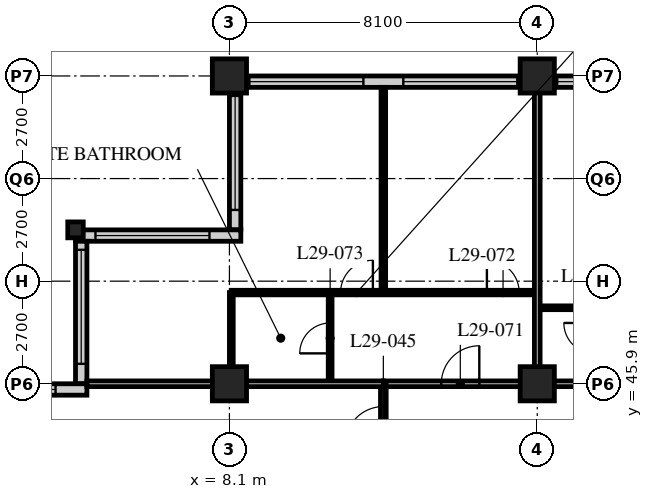
"""IFC4 building model, lengths in metres.
Left out: names, types, materials, properties, quantities, classifications, styles, units other than length and angle.
Written with IfcOpenShell. Run it as: python <this file> out.ifc"""

import sys

from ifc_helpers import new_model, si_unit, direction, frame, frame_2d, origin, origin_2d, place, context, subcontext, project, spatial, rectangle, hollow_rectangle, i_section, extrude, element, fill, save


model = new_model("IFC4")
c1 = context("Model", 3, precision=1e-05, world=origin(), true_north=direction((0.0, 1.0)))
c2 = subcontext(c1, "Body", "Model", "MODEL_VIEW")
j1 = project(units=[si_unit("LENGTHUNIT", "METRE"), si_unit("PLANEANGLEUNIT", "RADIAN")], contexts=[c1])
p1 = place(None, origin())
s1 = spatial("IfcSite", under=j1, at=p1, CompositionType="ELEMENT")
p2 = place(p1, origin())
s2 = spatial("IfcBuilding", under=s1, at=p2, CompositionType="ELEMENT")
p3 = place(p2, frame((0.0, 0.0, 117.0)))
s3 = spatial("IfcBuildingStorey", under=s2, at=p3, CompositionType="ELEMENT", Elevation=117.0)
p4 = place(p3, frame((4.05, 49.95, 0.0), z_axis=(0.0, 0.0, 1.0), x_axis=(1.0, 0.0, 0.0)))
e1 = element("IfcColumn", 1, at=p4, inside=s3, PredefinedType="COLUMN", context=c2, shape_type="SweptSolid", body=[
    extrude(i_section(OverallWidth=0.407, OverallDepth=0.419, WebThickness=0.031, FlangeThickness=0.049, FilletRadius=0.015, at=origin_2d()), origin(), (0.0, 0.0, 1.0), 3.4),
])
for number, where, z_axis, x_axis in (
    (2, (8.1, 45.9, 0.0), (0.0, 0.0, 1.0), (1.0, 0.0, 0.0)),
    (3, (8.1, 54.0, 0.0), (0.0, 0.0, 1.0), (1.0, 0.0, 0.0)),
    (4, (16.2, 45.9, 0.0), (0.0, 0.0, 1.0), (1.0, 0.0, 0.0)),
    (5, (16.2, 54.0, 0.0), (0.0, 0.0, 1.0), (1.0, 0.0, 0.0)),
):
    element("IfcColumn", number, at=place(p3, frame(where, z_axis=z_axis, x_axis=x_axis)), inside=s3, PredefinedType="COLUMN", context=c2, shape_type="SweptSolid", body=[
        extrude(hollow_rectangle(XDim=0.9, YDim=0.9, WallThickness=0.09, at=origin_2d()), origin(), (0.0, 0.0, 1.0), 3.4),
    ])
p5 = place(p3, frame((48.3, 53.85, 0.0), z_axis=(0.0, 0.0, 1.0), x_axis=(-1.0, 0.0, 0.0)))
e6 = element("IfcWall", 6, at=p5, inside=s3, PredefinedType="SOLIDWALL", context=c2, shape_type="SweptSolid", body=[
    extrude(rectangle(XDim=40.2, YDim=0.3, at=frame_2d((20.1, 0.0))), origin(), (0.0, 0.0, 1.0), 3.19),
])
p6 = place(p5, frame((0.225, 0.0, 0.9)))
e7 = element("IfcOpeningElement", 7, at=p6, cuts=e6, PredefinedType="OPENING", context=c2, shape_type="SweptSolid", body=[
    extrude(rectangle(XDim=3.0, YDim=2.0, at=frame_2d((1.5, 1.0))), frame((0.0, 0.16, 0.0), z_axis=(0.0, -1.0, 0.0), x_axis=(1.0, 0.0, 0.0)), (0.0, 0.0, 1.0), 0.32),
])
p7 = place(p5, frame((4.275, 0.0, 0.9)))
e8 = element("IfcOpeningElement", 8, at=p7, cuts=e6, PredefinedType="OPENING", context=c2, shape_type="SweptSolid", body=[
    extrude(rectangle(XDim=3.0, YDim=2.0, at=frame_2d((1.5, 1.0))), frame((0.0, 0.16, 0.0), z_axis=(0.0, -1.0, 0.0), x_axis=(1.0, 0.0, 0.0)), (0.0, 0.0, 1.0), 0.32),
])
p8 = place(p5, frame((8.325, 0.0, 0.9)))
e9 = element("IfcOpeningElement", 9, at=p8, cuts=e6, PredefinedType="OPENING", context=c2, shape_type="SweptSolid", body=[
    extrude(rectangle(XDim=3.0, YDim=2.0, at=frame_2d((1.5, 1.0))), frame((0.0, 0.16, 0.0), z_axis=(0.0, -1.0, 0.0), x_axis=(1.0, 0.0, 0.0)), (0.0, 0.0, 1.0), 0.32),
])
p9 = place(p5, frame((12.375, 0.0, 0.9)))
e10 = element("IfcOpeningElement", 10, at=p9, cuts=e6, PredefinedType="OPENING", context=c2, shape_type="SweptSolid", body=[
    extrude(rectangle(XDim=3.0, YDim=2.0, at=frame_2d((1.5, 1.0))), frame((0.0, 0.16, 0.0), z_axis=(0.0, -1.0, 0.0), x_axis=(1.0, 0.0, 0.0)), (0.0, 0.0, 1.0), 0.32),
])
p10 = place(p5, frame((16.425, 0.0, 0.9)))
e11 = element("IfcOpeningElement", 11, at=p10, cuts=e6, PredefinedType="OPENING", context=c2, shape_type="SweptSolid", body=[
    extrude(rectangle(XDim=3.0, YDim=2.0, at=frame_2d((1.5, 1.0))), frame((0.0, 0.16, 0.0), z_axis=(0.0, -1.0, 0.0), x_axis=(1.0, 0.0, 0.0)), (0.0, 0.0, 1.0), 0.32),
])
p11 = place(p5, frame((20.475, 0.0, 0.9)))
e12 = element("IfcOpeningElement", 12, at=p11, cuts=e6, PredefinedType="OPENING", context=c2, shape_type="SweptSolid", body=[
    extrude(rectangle(XDim=3.0, YDim=2.0, at=frame_2d((1.5, 1.0))), frame((0.0, 0.16, 0.0), z_axis=(0.0, -1.0, 0.0), x_axis=(1.0, 0.0, 0.0)), (0.0, 0.0, 1.0), 0.32),
])
p12 = place(p5, frame((24.525, 0.0, 0.9)))
e13 = element("IfcOpeningElement", 13, at=p12, cuts=e6, PredefinedType="OPENING", context=c2, shape_type="SweptSolid", body=[
    extrude(rectangle(XDim=3.0, YDim=2.0, at=frame_2d((1.5, 1.0))), frame((0.0, 0.16, 0.0), z_axis=(0.0, -1.0, 0.0), x_axis=(1.0, 0.0, 0.0)), (0.0, 0.0, 1.0), 0.32),
])
p13 = place(p5, frame((28.575, 0.0, 0.9)))
e14 = element("IfcOpeningElement", 14, at=p13, cuts=e6, PredefinedType="OPENING", context=c2, shape_type="SweptSolid", body=[
    extrude(rectangle(XDim=3.0, YDim=2.0, at=frame_2d((1.5, 1.0))), frame((0.0, 0.16, 0.0), z_axis=(0.0, -1.0, 0.0), x_axis=(1.0, 0.0, 0.0)), (0.0, 0.0, 1.0), 0.32),
])
p14 = place(p5, frame((32.625, 0.0, 0.9)))
e15 = element("IfcOpeningElement", 15, at=p14, cuts=e6, PredefinedType="OPENING", context=c2, shape_type="SweptSolid", body=[
    extrude(rectangle(XDim=3.0, YDim=2.0, at=frame_2d((1.5, 1.0))), frame((0.0, 0.16, 0.0), z_axis=(0.0, -1.0, 0.0), x_axis=(1.0, 0.0, 0.0)), (0.0, 0.0, 1.0), 0.32),
])
p15 = place(p5, frame((36.675, 0.0, 0.9)))
e16 = element("IfcOpeningElement", 16, at=p15, cuts=e6, PredefinedType="OPENING", context=c2, shape_type="SweptSolid", body=[
    extrude(rectangle(XDim=3.0, YDim=2.0, at=frame_2d((1.5, 1.0))), frame((0.0, 0.16, 0.0), z_axis=(0.0, -1.0, 0.0), x_axis=(1.0, 0.0, 0.0)), (0.0, 0.0, 1.0), 0.32),
])
p16 = place(p3, frame((8.25, 53.7, 0.0), z_axis=(0.0, 0.0, 1.0), x_axis=(0.0, -1.0, 0.0)))
e17 = element("IfcWall", 17, at=p16, inside=s3, PredefinedType="SOLIDWALL", context=c2, shape_type="SweptSolid", body=[
    extrude(rectangle(XDim=3.75, YDim=0.3, at=frame_2d((1.875, 0.0))), origin(), (0.0, 0.0, 1.0), 3.19),
])
p17 = place(p16, frame((0.225, 0.0, 0.9)))
e18 = element("IfcOpeningElement", 18, at=p17, cuts=e17, PredefinedType="OPENING", context=c2, shape_type="SweptSolid", body=[
    extrude(rectangle(XDim=3.0, YDim=1.5, at=frame_2d((1.5, 0.75))), frame((0.0, 0.16, 0.0), z_axis=(0.0, -1.0, 0.0), x_axis=(1.0, 0.0, 0.0)), (0.0, 0.0, 1.0), 0.32),
])
p18 = place(p3, frame((8.4, 49.8, 0.0), z_axis=(0.0, 0.0, 1.0), x_axis=(-1.0, 0.0, 0.0)))
e19 = element("IfcWall", 19, at=p18, inside=s3, PredefinedType="SOLIDWALL", context=c2, shape_type="SweptSolid", body=[
    extrude(rectangle(XDim=4.35, YDim=0.3, at=frame_2d((2.175, 0.0))), origin(), (0.0, 0.0, 1.0), 3.19),
])
p19 = place(p18, frame((0.825, 0.0, 0.9)))
e20 = element("IfcOpeningElement", 20, at=p19, cuts=e19, PredefinedType="OPENING", context=c2, shape_type="SweptSolid", body=[
    extrude(rectangle(XDim=3.0, YDim=1.5, at=frame_2d((1.5, 0.75))), frame((0.0, 0.16, 0.0), z_axis=(0.0, -1.0, 0.0), x_axis=(1.0, 0.0, 0.0)), (0.0, 0.0, 1.0), 0.32),
])
p20 = place(p3, frame((4.2, 49.65, 0.0), z_axis=(0.0, 0.0, 1.0), x_axis=(0.0, -1.0, 0.0)))
e21 = element("IfcWall", 21, at=p20, inside=s3, PredefinedType="SOLIDWALL", context=c2, shape_type="SweptSolid", body=[
    extrude(rectangle(XDim=3.75, YDim=0.3, at=frame_2d((1.875, 0.0))), origin(), (0.0, 0.0, 1.0), 3.19),
])
p21 = place(p20, frame((0.225, 0.0, 0.9)))
e22 = element("IfcOpeningElement", 22, at=p21, cuts=e21, PredefinedType="OPENING", context=c2, shape_type="SweptSolid", body=[
    extrude(rectangle(XDim=3.0, YDim=1.5, at=frame_2d((1.5, 0.75))), frame((0.0, 0.16, 0.0), z_axis=(0.0, -1.0, 0.0), x_axis=(1.0, 0.0, 0.0)), (0.0, 0.0, 1.0), 0.32),
])
p22 = place(p3, frame((4.35, 45.75, 0.0), z_axis=(0.0, 0.0, 1.0), x_axis=(-1.0, 0.0, 0.0)))
e23 = element("IfcWall", 23, at=p22, inside=s3, PredefinedType="SOLIDWALL", context=c2, shape_type="SweptSolid", body=[
    extrude(rectangle(XDim=4.35, YDim=0.3, at=frame_2d((2.175, 0.0))), origin(), (0.0, 0.0, 1.0), 3.19),
])
p23 = place(p22, frame((0.825, 0.0, 0.9)))
e24 = element("IfcOpeningElement", 24, at=p23, cuts=e23, PredefinedType="OPENING", context=c2, shape_type="SweptSolid", body=[
    extrude(rectangle(XDim=3.0, YDim=1.5, at=frame_2d((1.5, 0.75))), frame((0.0, 0.16, 0.0), z_axis=(0.0, -1.0, 0.0), x_axis=(1.0, 0.0, 0.0)), (0.0, 0.0, 1.0), 0.32),
])
p24 = place(p3, frame((12.15, 45.9, 0.0), z_axis=(0.0, 0.0, 1.0), x_axis=(1.0, 0.0, 0.0)))
e25 = element("IfcWall", 25, at=p24, inside=s3, PredefinedType="PARTITIONING", context=c2, shape_type="SweptSolid", body=[
    extrude(rectangle(XDim=32.4, YDim=0.15, at=frame_2d((16.2, 0.0))), origin(), (0.0, 0.0, 1.0), 2.578),
])
p25 = place(p24, frame((5.95, 0.0, 0.0)))
e26 = element("IfcOpeningElement", 26, at=p25, cuts=e25, PredefinedType="OPENING", context=c2, shape_type="SweptSolid", body=[
    extrude(rectangle(XDim=1.0, YDim=2.1, at=frame_2d((0.5, 1.05))), frame((0.0, 0.085, 0.0), z_axis=(0.0, -1.0, 0.0), x_axis=(1.0, 0.0, 0.0)), (0.0, 0.0, 1.0), 0.17),
])
p26 = place(p24, frame((14.05, 0.0, 0.0)))
e27 = element("IfcOpeningElement", 27, at=p26, cuts=e25, PredefinedType="OPENING", context=c2, shape_type="SweptSolid", body=[
    extrude(rectangle(XDim=1.0, YDim=2.1, at=frame_2d((0.5, 1.05))), frame((0.0, 0.085, 0.0), z_axis=(0.0, -1.0, 0.0), x_axis=(1.0, 0.0, 0.0)), (0.0, 0.0, 1.0), 0.17),
])
p27 = place(p24, frame((25.7, 0.0, 0.0)))
e28 = element("IfcOpeningElement", 28, at=p27, cuts=e25, PredefinedType="OPENING", context=c2, shape_type="SweptSolid", body=[
    extrude(rectangle(XDim=1.0, YDim=2.1, at=frame_2d((0.5, 1.05))), frame((0.0, 0.085, 0.0), z_axis=(0.0, -1.0, 0.0), x_axis=(1.0, 0.0, 0.0)), (0.0, 0.0, 1.0), 0.17),
])
p28 = place(p24, frame((29.875, 0.0, 0.0)))
e29 = element("IfcOpeningElement", 29, at=p28, cuts=e25, PredefinedType="OPENING", context=c2, shape_type="SweptSolid", body=[
    extrude(rectangle(XDim=1.0, YDim=2.1, at=frame_2d((0.5, 1.05))), frame((0.0, 0.085, 0.0), z_axis=(0.0, -1.0, 0.0), x_axis=(1.0, 0.0, 0.0)), (0.0, 0.0, 1.0), 0.17),
])
p29 = place(p24, frame((1.525, 0.0, 0.0)))
e30 = element("IfcOpeningElement", 30, at=p29, cuts=e25, PredefinedType="OPENING", context=c2, shape_type="SweptSolid", body=[
    extrude(rectangle(XDim=1.0, YDim=2.1, at=frame_2d((0.5, 1.05))), frame((0.0, 0.085, 0.0), z_axis=(0.0, -1.0, 0.0), x_axis=(1.0, 0.0, 0.0)), (0.0, 0.0, 1.0), 0.17),
])
p30 = place(p3, frame((12.15, 17.55, 0.0), z_axis=(0.0, 0.0, 1.0), x_axis=(0.0, 1.0, 0.0)))
e31 = element("IfcWall", 31, at=p30, inside=s3, PredefinedType="PARTITIONING", context=c2, shape_type="SweptSolid", body=[
    extrude(rectangle(XDim=28.35, YDim=0.15, at=frame_2d((14.175, 0.0))), origin(), (0.0, 0.0, 1.0), 3.19),
])
p31 = place(p30, frame((5.45, 0.0, 0.0)))
e32 = element("IfcOpeningElement", 32, at=p31, cuts=e31, PredefinedType="OPENING", context=c2, shape_type="SweptSolid", body=[
    extrude(rectangle(XDim=1.0, YDim=2.1, at=frame_2d((0.5, 1.05))), frame((0.0, 0.085, 0.0), z_axis=(0.0, -1.0, 0.0), x_axis=(1.0, 0.0, 0.0)), (0.0, 0.0, 1.0), 0.17),
])
p32 = place(p30, frame((13.55, 0.0, 0.0)))
e33 = element("IfcOpeningElement", 33, at=p32, cuts=e31, PredefinedType="OPENING", context=c2, shape_type="SweptSolid", body=[
    extrude(rectangle(XDim=1.0, YDim=2.1, at=frame_2d((0.5, 1.05))), frame((0.0, 0.085, 0.0), z_axis=(0.0, -1.0, 0.0), x_axis=(1.0, 0.0, 0.0)), (0.0, 0.0, 1.0), 0.17),
])
p33 = place(p30, frame((21.65, 0.0, 0.0)))
e34 = element("IfcOpeningElement", 34, at=p33, cuts=e31, PredefinedType="OPENING", context=c2, shape_type="SweptSolid", body=[
    extrude(rectangle(XDim=1.0, YDim=2.1, at=frame_2d((0.5, 1.05))), frame((0.0, 0.085, 0.0), z_axis=(0.0, -1.0, 0.0), x_axis=(1.0, 0.0, 0.0)), (0.0, 0.0, 1.0), 0.17),
])
p34 = place(p30, frame((26.75, 0.0, 0.0)))
e35 = element("IfcOpeningElement", 35, at=p34, cuts=e31, PredefinedType="OPENING", context=c2, shape_type="SweptSolid", body=[
    extrude(rectangle(XDim=1.0, YDim=2.1, at=frame_2d((0.5, 1.05))), frame((0.0, 0.085, 0.0), z_axis=(0.0, -1.0, 0.0), x_axis=(1.0, 0.0, 0.0)), (0.0, 0.0, 1.0), 0.17),
])
p35 = place(p3, frame((16.2, 47.9, 0.0), z_axis=(0.0, 0.0, 1.0), x_axis=(1.0, 0.0, 0.0)))
e36 = element("IfcWall", 36, at=p35, inside=s3, PredefinedType="PARTITIONING", context=c2, shape_type="SweptSolid", body=[
    extrude(rectangle(XDim=1.5, YDim=0.1, at=frame_2d((0.75, 0.0))), origin(), (0.0, 0.0, 1.0), 3.19),
])
p36 = place(p3, frame((10.75, 45.9, 0.0), z_axis=(0.0, 0.0, 1.0), x_axis=(0.0, 1.0, 0.0)))
e37 = element("IfcWall", 37, at=p36, inside=s3, PredefinedType="PARTITIONING", context=c2, shape_type="SweptSolid", body=[
    extrude(rectangle(XDim=2.4, YDim=0.1, at=frame_2d((1.2, 0.0))), origin(), (0.0, 0.0, 1.0), 3.19),
])
p37 = place(p36, frame((0.8, 0.0, 0.0)))
e38 = element("IfcOpeningElement", 38, at=p37, cuts=e37, PredefinedType="OPENING", context=c2, shape_type="SweptSolid", body=[
    extrude(rectangle(XDim=0.8, YDim=2.1, at=frame_2d((0.4, 1.05))), frame((0.0, 0.06, 0.0), z_axis=(0.0, -1.0, 0.0), x_axis=(1.0, 0.0, 0.0)), (0.0, 0.0, 1.0), 0.12),
])
p38 = place(p3, frame((8.15, 45.9, 0.0), z_axis=(0.0, 0.0, 1.0), x_axis=(0.0, 1.0, 0.0)))
e39 = element("IfcWall", 39, at=p38, inside=s3, PredefinedType="PARTITIONING", context=c2, shape_type="SweptSolid", body=[
    extrude(rectangle(XDim=2.4, YDim=0.1, at=frame_2d((1.2, 0.0))), origin(), (0.0, 0.0, 1.0), 2.578),
])
p39 = place(p3, frame((8.15, 48.3, 0.0), z_axis=(0.0, 0.0, 1.0), x_axis=(1.0, 0.0, 0.0)))
e40 = element("IfcWall", 40, at=p39, inside=s3, PredefinedType="PARTITIONING", context=c2, shape_type="SweptSolid", body=[
    extrude(rectangle(XDim=8.05, YDim=0.12, at=frame_2d((4.025, 0.0))), origin(), (0.0, 0.0, 1.0), 3.19),
])
p40 = place(p39, frame((6.725, 0.0, 0.0)))
e41 = element("IfcOpeningElement", 41, at=p40, cuts=e40, PredefinedType="OPENING", context=c2, shape_type="SweptSolid", body=[
    extrude(rectangle(XDim=0.85, YDim=2.1, at=frame_2d((0.425, 1.05))), frame((0.0, 0.07, 0.0), z_axis=(0.0, -1.0, 0.0), x_axis=(1.0, 0.0, 0.0)), (0.0, 0.0, 1.0), 0.14),
])
p41 = place(p39, frame((2.875, 0.0, 0.0)))
e42 = element("IfcOpeningElement", 42, at=p41, cuts=e40, PredefinedType="OPENING", context=c2, shape_type="SweptSolid", body=[
    extrude(rectangle(XDim=0.85, YDim=2.1, at=frame_2d((0.425, 1.05))), frame((0.0, 0.07, 0.0), z_axis=(0.0, -1.0, 0.0), x_axis=(1.0, 0.0, 0.0)), (0.0, 0.0, 1.0), 0.14),
])
p42 = place(p3, frame((12.15, 48.3, 0.0), z_axis=(0.0, 0.0, 1.0), x_axis=(0.0, 1.0, 0.0)))
e43 = element("IfcWall", 43, at=p42, inside=s3, PredefinedType="PARTITIONING", context=c2, shape_type="SweptSolid", body=[
    extrude(rectangle(XDim=5.4, YDim=0.12, at=frame_2d((2.7, 0.0))), origin(), (0.0, 0.0, 1.0), 3.19),
])
p43 = place(p3, frame((4.35, 45.9, 0.0), z_axis=(0.0, 0.0, 1.0), x_axis=(1.0, 0.0, 0.0)))
e44 = element("IfcWall", 44, at=p43, inside=s3, PredefinedType="PARTITIONING", context=c2, shape_type="SweptSolid", body=[
    extrude(rectangle(XDim=7.8, YDim=0.15, at=frame_2d((3.9, 0.0))), origin(), (0.0, 0.0, 1.0), 2.578),
])
p44 = place(p3, frame((16.2, 45.9, 0.0), z_axis=(0.0, 0.0, 1.0), x_axis=(0.0, 1.0, 0.0)))
e45 = element("IfcWall", 45, at=p44, inside=s3, PredefinedType="PARTITIONING", context=c2, shape_type="SweptSolid", body=[
    extrude(rectangle(XDim=7.8, YDim=0.15, at=frame_2d((3.9, 0.0))), origin(), (0.0, 0.0, 1.0), 2.578),
])
p45 = place(p13, origin())
e46 = element("IfcWindow", 46, at=p45, inside=s3, PartitioningType="SINGLE_PANEL", PredefinedType="WINDOW", context=c2, shape_type="SweptSolid", body=[
    extrude(rectangle(XDim=3.0, YDim=2.0, at=frame_2d((1.5, 1.0))), frame((0.0, 0.03, 0.0), z_axis=(0.0, -1.0, 0.0), x_axis=(1.0, 0.0, 0.0)), (0.0, 0.0, 1.0), 0.06),
])
fill(e14, e46)
p46 = place(p14, origin())
e47 = element("IfcWindow", 47, at=p46, inside=s3, PartitioningType="SINGLE_PANEL", PredefinedType="WINDOW", context=c2, shape_type="SweptSolid", body=[
    extrude(rectangle(XDim=3.0, YDim=2.0, at=frame_2d((1.5, 1.0))), frame((0.0, 0.03, 0.0), z_axis=(0.0, -1.0, 0.0), x_axis=(1.0, 0.0, 0.0)), (0.0, 0.0, 1.0), 0.06),
])
fill(e15, e47)
p47 = place(p15, origin())
e48 = element("IfcWindow", 48, at=p47, inside=s3, PartitioningType="SINGLE_PANEL", PredefinedType="WINDOW", context=c2, shape_type="SweptSolid", body=[
    extrude(rectangle(XDim=3.0, YDim=2.0, at=frame_2d((1.5, 1.0))), frame((0.0, 0.03, 0.0), z_axis=(0.0, -1.0, 0.0), x_axis=(1.0, 0.0, 0.0)), (0.0, 0.0, 1.0), 0.06),
])
fill(e16, e48)
p48 = place(p17, origin())
e49 = element("IfcWindow", 49, at=p48, inside=s3, PartitioningType="SINGLE_PANEL", PredefinedType="WINDOW", context=c2, shape_type="SweptSolid", body=[
    extrude(rectangle(XDim=3.0, YDim=1.5, at=frame_2d((1.5, 0.75))), frame((0.0, 0.03, 0.0), z_axis=(0.0, -1.0, 0.0), x_axis=(1.0, 0.0, 0.0)), (0.0, 0.0, 1.0), 0.06),
])
fill(e18, e49)
p49 = place(p19, origin())
e50 = element("IfcWindow", 50, at=p49, inside=s3, PartitioningType="SINGLE_PANEL", PredefinedType="WINDOW", context=c2, shape_type="SweptSolid", body=[
    extrude(rectangle(XDim=3.0, YDim=1.5, at=frame_2d((1.5, 0.75))), frame((0.0, 0.03, 0.0), z_axis=(0.0, -1.0, 0.0), x_axis=(1.0, 0.0, 0.0)), (0.0, 0.0, 1.0), 0.06),
])
fill(e20, e50)
p50 = place(p21, origin())
e51 = element("IfcWindow", 51, at=p50, inside=s3, PartitioningType="SINGLE_PANEL", PredefinedType="WINDOW", context=c2, shape_type="SweptSolid", body=[
    extrude(rectangle(XDim=3.0, YDim=1.5, at=frame_2d((1.5, 0.75))), frame((0.0, 0.03, 0.0), z_axis=(0.0, -1.0, 0.0), x_axis=(1.0, 0.0, 0.0)), (0.0, 0.0, 1.0), 0.06),
])
fill(e22, e51)
p51 = place(p23, origin())
e52 = element("IfcWindow", 52, at=p51, inside=s3, PartitioningType="SINGLE_PANEL", PredefinedType="WINDOW", context=c2, shape_type="SweptSolid", body=[
    extrude(rectangle(XDim=3.0, YDim=1.5, at=frame_2d((1.5, 0.75))), frame((0.0, 0.03, 0.0), z_axis=(0.0, -1.0, 0.0), x_axis=(1.0, 0.0, 0.0)), (0.0, 0.0, 1.0), 0.06),
])
fill(e24, e52)
p52 = place(p34, origin())
e53 = element("IfcDoor", 53, at=p52, inside=s3, OperationType="SINGLE_SWING_LEFT", PredefinedType="DOOR", context=c2, shape_type="SweptSolid", body=[
    extrude(rectangle(XDim=1.0, YDim=2.1, at=frame_2d((0.5, 1.05))), frame((0.0, 0.025, 0.0), z_axis=(0.0, -1.0, 0.0), x_axis=(1.0, 0.0, 0.0)), (0.0, 0.0, 1.0), 0.05),
])
fill(e35, e53)
p53 = place(p29, origin())
e54 = element("IfcDoor", 54, at=p53, inside=s3, OperationType="SINGLE_SWING_RIGHT", PredefinedType="DOOR", context=c2, shape_type="SweptSolid", body=[
    extrude(rectangle(XDim=1.0, YDim=2.1, at=frame_2d((0.5, 1.05))), frame((0.0, 0.025, 0.0), z_axis=(0.0, -1.0, 0.0), x_axis=(1.0, 0.0, 0.0)), (0.0, 0.0, 1.0), 0.05),
])
fill(e30, e54)
p54 = place(p40, origin())
e55 = element("IfcDoor", 55, at=p54, inside=s3, OperationType="SINGLE_SWING_LEFT", PredefinedType="DOOR", context=c2, shape_type="SweptSolid", body=[
    extrude(rectangle(XDim=0.85, YDim=2.1, at=frame_2d((0.425, 1.05))), frame((0.0, 0.025, 0.0), z_axis=(0.0, -1.0, 0.0), x_axis=(1.0, 0.0, 0.0)), (0.0, 0.0, 1.0), 0.05),
])
fill(e41, e55)
p55 = place(p37, origin())
e56 = element("IfcDoor", 56, at=p55, inside=s3, OperationType="SINGLE_SWING_LEFT", PredefinedType="DOOR", context=c2, shape_type="SweptSolid", body=[
    extrude(rectangle(XDim=0.8, YDim=2.1, at=frame_2d((0.4, 1.05))), frame((0.0, 0.025, 0.0), z_axis=(0.0, -1.0, 0.0), x_axis=(1.0, 0.0, 0.0)), (0.0, 0.0, 1.0), 0.05),
])
fill(e38, e56)
p56 = place(p41, origin())
e57 = element("IfcDoor", 57, at=p56, inside=s3, OperationType="SINGLE_SWING_RIGHT", PredefinedType="DOOR", context=c2, shape_type="SweptSolid", body=[
    extrude(rectangle(XDim=0.85, YDim=2.1, at=frame_2d((0.425, 1.05))), frame((0.0, 0.025, 0.0), z_axis=(0.0, -1.0, 0.0), x_axis=(1.0, 0.0, 0.0)), (0.0, 0.0, 1.0), 0.05),
])
fill(e42, e57)
save(model, sys.argv[1])
